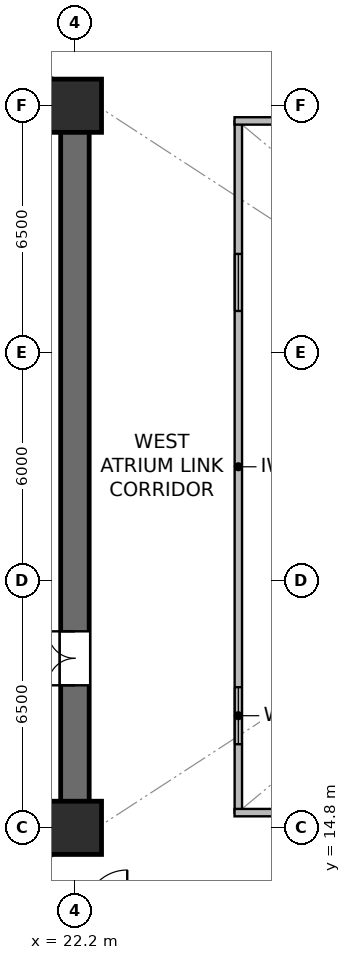
"""IFC4 building model, lengths in metres.
Left out: names, types, materials, properties, quantities, classifications, styles, units other than length and angle.
Written with IfcOpenShell. Run it as: python <this file> out.ifc"""

import sys

from ifc_helpers import new_model, si_unit, direction, frame, frame_2d, origin, origin_2d, place, context, subcontext, project, spatial, rectangle, extrude, source, transform, mapped, element, fill, save


model = new_model("IFC4")
c1 = context("Model", 3, precision=1e-05, world=origin(), true_north=direction((0.0, 1.0)))
c2 = subcontext(c1, "Body", "Model", "MODEL_VIEW")
j1 = project(units=[si_unit("LENGTHUNIT", "METRE"), si_unit("PLANEANGLEUNIT", "RADIAN")], contexts=[c1])
p1 = place(None, origin())
s1 = spatial("IfcSite", under=j1, at=p1, CompositionType="ELEMENT")
p2 = place(p1, origin())
s2 = spatial("IfcBuilding", under=s1, at=p2, CompositionType="ELEMENT")
p3 = place(p2, frame((0.0, 0.0, 25.2)))
s3 = spatial("IfcBuildingStorey", under=s2, at=p3, CompositionType="ELEMENT", Elevation=25.2)
p4 = place(p3, frame((7.025, 14.8, 0.0), z_axis=(0.0, 0.0, 1.0), x_axis=(1.0, 0.0, 0.0)))
e1 = element("IfcWall", 1, at=p4, inside=s3, PredefinedType="SHEAR", context=c2, shape_type="SweptSolid", body=[
    extrude(rectangle(XDim=15.55, YDim=0.75, at=frame_2d((7.775, 0.0))), origin(), (0.0, 0.0, 1.0), 3.78),
])
p5 = place(p3, frame((7.025, 33.8, 0.0), z_axis=(0.0, 0.0, 1.0), x_axis=(1.0, 0.0, 0.0)))
e2 = element("IfcWall", 2, at=p5, inside=s3, PredefinedType="SHEAR", context=c2, shape_type="SweptSolid", body=[
    extrude(rectangle(XDim=15.55, YDim=0.75, at=frame_2d((7.775, 0.0))), origin(), (0.0, 0.0, 1.0), 3.78),
])
p6 = place(p5, frame((6.875, 0.0, 0.0)))
e3 = element("IfcOpeningElement", 3, at=p6, cuts=e2, PredefinedType="OPENING", context=c2, shape_type="SweptSolid", body=[
    extrude(rectangle(XDim=0.95, YDim=2.15, at=frame_2d((0.475, 1.075))), frame((0.0, 0.385, 0.0), z_axis=(0.0, -1.0, 0.0), x_axis=(1.0, 0.0, 0.0)), (0.0, 0.0, 1.0), 0.77),
])
p7 = place(p5, frame((11.94, 0.0, 0.0)))
e4 = element("IfcOpeningElement", 4, at=p7, cuts=e2, PredefinedType="OPENING", context=c2, shape_type="SweptSolid", body=[
    extrude(rectangle(XDim=0.95, YDim=2.15, at=frame_2d((0.475, 1.075))), frame((0.0, 0.385, 0.0), z_axis=(0.0, -1.0, 0.0), x_axis=(1.0, 0.0, 0.0)), (0.0, 0.0, 1.0), 0.77),
])
p8 = place(p3, frame((22.2, 15.175, 0.0), z_axis=(0.0, 0.0, 1.0), x_axis=(0.0, 1.0, 0.0)))
e5 = element("IfcWall", 5, at=p8, inside=s3, PredefinedType="SHEAR", context=c2, shape_type="SweptSolid", body=[
    extrude(rectangle(XDim=18.25, YDim=0.75, at=frame_2d((9.125, 0.0))), origin(), (0.0, 0.0, 1.0), 3.78),
])
p9 = place(p8, frame((3.375, 0.0, 0.0)))
e6 = element("IfcOpeningElement", 6, at=p9, cuts=e5, PredefinedType="OPENING", context=c2, shape_type="SweptSolid", body=[
    extrude(rectangle(XDim=1.42, YDim=2.2, at=frame_2d((0.71, 1.1))), frame((0.0, 0.385, 0.0), z_axis=(0.0, -1.0, 0.0), x_axis=(1.0, 0.0, 0.0)), (0.0, 0.0, 1.0), 0.77),
])
m1 = source(origin(), c2, "Body", "SweptSolid", [
    extrude(rectangle(XDim=1.4, YDim=1.4, at=origin_2d()), origin(), (0.0, 0.0, 1.0), 4.1),
])
for number, where, z_axis, x_axis in (
    (7, (22.2, 14.8, 0.0), (0.0, 0.0, 1.0), (1.0, 0.0, 0.0)),
    (8, (22.2, 33.8, 0.0), (0.0, 0.0, 1.0), (1.0, 0.0, 0.0)),
):
    element("IfcColumn", number, at=place(p3, frame(where, z_axis=z_axis, x_axis=x_axis)), inside=s3, PredefinedType="COLUMN", context=c2, shape_type="MappedRepresentation", body=[
        mapped(m1, transform((0.0, 0.0, 0.0), scale=1.0)),
    ])
p10 = place(p3, frame((26.5, 15.2, 0.0), z_axis=(0.0, 0.0, 1.0), x_axis=(0.0, 1.0, 0.0)))
e9 = element("IfcWall", 9, at=p10, inside=s3, PredefinedType="SOLIDWALL", context=c2, shape_type="SweptSolid", body=[
    extrude(rectangle(XDim=18.2, YDim=0.195, at=frame_2d((9.1, 0.0))), origin(), (0.0, 0.0, 1.0), 3.78),
])
p11 = place(p10, frame((1.8, 0.0, 0.9)))
e10 = element("IfcOpeningElement", 10, at=p11, cuts=e9, PredefinedType="OPENING", context=c2, shape_type="SweptSolid", body=[
    extrude(rectangle(XDim=1.5, YDim=1.4, at=frame_2d((0.75, 0.7))), frame((0.0, 0.107, 0.0), z_axis=(0.0, -1.0, 0.0), x_axis=(1.0, 0.0, 0.0)), (0.0, 0.0, 1.0), 0.215),
])
p12 = place(p10, frame((13.2, 0.0, 0.9)))
e11 = element("IfcOpeningElement", 11, at=p12, cuts=e9, PredefinedType="OPENING", context=c2, shape_type="SweptSolid", body=[
    extrude(rectangle(XDim=1.5, YDim=1.4, at=frame_2d((0.75, 0.7))), frame((0.0, 0.107, 0.0), z_axis=(0.0, -1.0, 0.0), x_axis=(1.0, 0.0, 0.0)), (0.0, 0.0, 1.0), 0.215),
])
for number, where, z_axis, x_axis in (
    (12, (26.4, 15.2, 0.0), (0.0, 0.0, 1.0), (1.0, 0.0, 0.0)),
    (13, (26.4, 33.4, 0.0), (0.0, 0.0, 1.0), (1.0, 0.0, 0.0)),
):
    element("IfcWall", number, at=place(p3, frame(where, z_axis=z_axis, x_axis=x_axis)), inside=s3, PredefinedType="SOLIDWALL", context=c2, shape_type="SweptSolid", body=[
        extrude(rectangle(XDim=22.0, YDim=0.195, at=frame_2d((11.0, 0.0))), origin(), (0.0, 0.0, 1.0), 3.78),
    ])
m2 = source(origin(), c2, "Body", "SweptSolid", [
    extrude(rectangle(XDim=1.5, YDim=1.4, at=frame_2d((0.75, 0.7))), frame((0.0, 0.03, 0.0), z_axis=(0.0, -1.0, 0.0), x_axis=(1.0, 0.0, 0.0)), (0.0, 0.0, 1.0), 0.06),
])
p13 = place(p11, origin())
e14 = element("IfcWindow", 14, at=p13, inside=s3, PartitioningType="SINGLE_PANEL", PredefinedType="WINDOW", context=c2, shape_type="MappedRepresentation", body=[
    mapped(m2, transform((0.0, 0.0, 0.0), scale=1.0)),
])
fill(e10, e14)
p14 = place(p12, origin())
e15 = element("IfcWindow", 15, at=p14, inside=s3, PartitioningType="SINGLE_PANEL", PredefinedType="WINDOW", context=c2, shape_type="MappedRepresentation", body=[
    mapped(m2, transform((0.0, 0.0, 0.0), scale=1.0)),
])
fill(e11, e15)
m3 = source(origin(), c2, "Body", "SweptSolid", [
    extrude(rectangle(XDim=1.42, YDim=2.2, at=frame_2d((0.71, 1.1))), frame((0.0, 0.025, 0.0), z_axis=(0.0, -1.0, 0.0), x_axis=(1.0, 0.0, 0.0)), (0.0, 0.0, 1.0), 0.05),
])
p15 = place(p9, origin())
e16 = element("IfcDoor", 16, at=p15, inside=s3, OperationType="DOUBLE_DOOR_SINGLE_SWING", PredefinedType="DOOR", context=c2, shape_type="MappedRepresentation", body=[
    mapped(m3, transform((0.0, 0.0, 0.0), scale=1.0)),
])
fill(e6, e16)
save(model, sys.argv[1])
